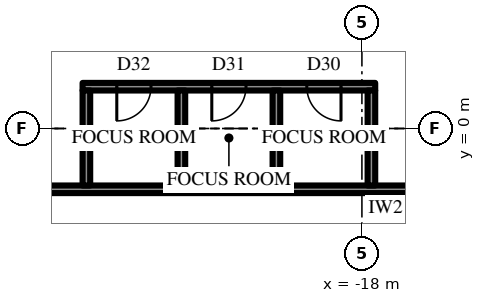
"""IFC4 building model, lengths in metres.
Left out: names, types, materials, properties, quantities, classifications, styles, units other than length and angle.
Written with IfcOpenShell. Run it as: python <this file> out.ifc"""

import sys

from ifc_helpers import new_model, si_unit, direction, frame, frame_2d, origin, place, context, subcontext, project, spatial, rectangle, extrude, element, fill, save


model = new_model("IFC4")
c1 = context("Model", 3, precision=1e-05, world=origin(), true_north=direction((0.0, 1.0)))
c2 = subcontext(c1, "Body", "Model", "MODEL_VIEW")
j1 = project(units=[si_unit("LENGTHUNIT", "METRE"), si_unit("PLANEANGLEUNIT", "RADIAN")], contexts=[c1])
p1 = place(None, origin())
s1 = spatial("IfcSite", under=j1, at=p1, CompositionType="ELEMENT")
p2 = place(p1, origin())
s2 = spatial("IfcBuilding", under=s1, at=p2, CompositionType="ELEMENT")
p3 = place(p2, frame((0.0, 0.0, 361.9)))
s3 = spatial("IfcBuildingStorey", under=s2, at=p3, CompositionType="ELEMENT", Elevation=361.9)
p4 = place(p3, frame((-29.459, -2.175, 0.0), z_axis=(0.0, 0.0, 1.0), x_axis=(0.499996453679, -0.866027451244, 0.0)))
e1 = element("IfcWall", 1, at=p4, inside=s3, PredefinedType="SOLIDWALL", context=c2, shape_type="SweptSolid", body=[
    extrude(rectangle(XDim=9.564, YDim=0.3, at=frame_2d((4.782, 0.0))), origin(), (0.0, 0.0, 1.0), 2.9),
])
p5 = place(p4, frame((0.866, 0.0, 0.6)))
e2 = element("IfcOpeningElement", 2, at=p5, cuts=e1, PredefinedType="OPENING", context=c2, shape_type="SweptSolid", body=[
    extrude(rectangle(XDim=2.55, YDim=2.05, at=frame_2d((1.275, 1.025))), frame((0.0, 0.16, 0.0), z_axis=(0.0, -1.0, 0.0), x_axis=(1.0, 0.0, 0.0)), (0.0, 0.0, 1.0), 0.32),
])
p6 = place(p4, frame((5.823, 0.0, 0.0)))
e3 = element("IfcOpeningElement", 3, at=p6, cuts=e1, PredefinedType="OPENING", context=c2, shape_type="SweptSolid", body=[
    extrude(rectangle(XDim=1.2, YDim=2.4, at=frame_2d((0.6, 1.2))), frame((0.0, 0.16, 0.0), z_axis=(0.0, -1.0, 0.0), x_axis=(1.0, 0.0, 0.0)), (0.0, 0.0, 1.0), 0.32),
])
p7 = place(p3, frame((-12.425, -1.6, 0.0), z_axis=(0.0, 0.0, 1.0), x_axis=(-1.0, 0.0, 0.0)))
e4 = element("IfcWall", 4, at=p7, inside=s3, PredefinedType="PARTITIONING", context=c2, shape_type="SweptSolid", body=[
    extrude(rectangle(XDim=16.5, YDim=0.2, at=frame_2d((8.25, 0.0))), origin(), (0.0, 0.0, 1.0), 4.0),
])
p8 = place(p7, frame((1.15, 0.0, 0.0)))
e5 = element("IfcOpeningElement", 5, at=p8, cuts=e4, PredefinedType="OPENING", context=c2, shape_type="SweptSolid", body=[
    extrude(rectangle(XDim=1.0, YDim=2.2, at=frame_2d((0.5, 1.1))), frame((0.0, 0.11, 0.0), z_axis=(0.0, -1.0, 0.0), x_axis=(1.0, 0.0, 0.0)), (0.0, 0.0, 1.0), 0.22),
])
p9 = place(p3, frame((-17.65, 1.1, 0.0), z_axis=(0.0, 0.0, 1.0), x_axis=(-1.0, 0.0, 0.0)))
e6 = element("IfcWall", 6, at=p9, inside=s3, PredefinedType="PARTITIONING", context=c2, shape_type="SweptSolid", body=[
    extrude(rectangle(XDim=7.7, YDim=0.2, at=frame_2d((3.85, 0.0))), origin(), (0.0, 0.0, 1.0), 4.0),
])
p10 = place(p9, frame((0.9, 0.0, 0.0)))
e7 = element("IfcOpeningElement", 7, at=p10, cuts=e6, PredefinedType="OPENING", context=c2, shape_type="SweptSolid", body=[
    extrude(rectangle(XDim=0.9, YDim=2.2, at=frame_2d((0.45, 1.1))), frame((0.0, 0.11, 0.0), z_axis=(0.0, -1.0, 0.0), x_axis=(1.0, 0.0, 0.0)), (0.0, 0.0, 1.0), 0.22),
])
p11 = place(p9, frame((3.4, 0.0, 0.0)))
e8 = element("IfcOpeningElement", 8, at=p11, cuts=e6, PredefinedType="OPENING", context=c2, shape_type="SweptSolid", body=[
    extrude(rectangle(XDim=0.9, YDim=2.2, at=frame_2d((0.45, 1.1))), frame((0.0, 0.11, 0.0), z_axis=(0.0, -1.0, 0.0), x_axis=(1.0, 0.0, 0.0)), (0.0, 0.0, 1.0), 0.22),
])
p12 = place(p9, frame((5.9, 0.0, 0.0)))
e9 = element("IfcOpeningElement", 9, at=p12, cuts=e6, PredefinedType="OPENING", context=c2, shape_type="SweptSolid", body=[
    extrude(rectangle(XDim=0.9, YDim=2.2, at=frame_2d((0.45, 1.1))), frame((0.0, 0.11, 0.0), z_axis=(0.0, -1.0, 0.0), x_axis=(1.0, 0.0, 0.0)), (0.0, 0.0, 1.0), 0.22),
])
for number, where, z_axis, x_axis in (
    (10, (-17.75, -1.5, 0.0), (0.0, 0.0, 1.0), (0.0, 1.0, 0.0)),
    (11, (-20.25, -1.5, 0.0), (0.0, 0.0, 1.0), (0.0, 1.0, 0.0)),
    (12, (-22.75, -1.5, 0.0), (0.0, 0.0, 1.0), (0.0, 1.0, 0.0)),
    (13, (-25.25, -1.5, 0.0), (0.0, 0.0, 1.0), (0.0, 1.0, 0.0)),
):
    element("IfcWall", number, at=place(p3, frame(where, z_axis=z_axis, x_axis=x_axis)), inside=s3, PredefinedType="PARTITIONING", context=c2, shape_type="SweptSolid", body=[
        extrude(rectangle(XDim=2.5, YDim=0.2, at=frame_2d((1.25, 0.0))), origin(), (0.0, 0.0, 1.0), 4.0),
    ])
p13 = place(p10, origin())
e14 = element("IfcDoor", 14, at=p13, inside=s3, OperationType="SINGLE_SWING_RIGHT", PredefinedType="DOOR", context=c2, shape_type="SweptSolid", body=[
    extrude(rectangle(XDim=0.9, YDim=2.2, at=frame_2d((0.45, 1.1))), frame((0.0, 0.025, 0.0), z_axis=(0.0, -1.0, 0.0), x_axis=(1.0, 0.0, 0.0)), (0.0, 0.0, 1.0), 0.05),
])
fill(e7, e14)
p14 = place(p11, origin())
e15 = element("IfcDoor", 15, at=p14, inside=s3, OperationType="SINGLE_SWING_LEFT", PredefinedType="DOOR", context=c2, shape_type="SweptSolid", body=[
    extrude(rectangle(XDim=0.9, YDim=2.2, at=frame_2d((0.45, 1.1))), frame((0.0, 0.025, 0.0), z_axis=(0.0, -1.0, 0.0), x_axis=(1.0, 0.0, 0.0)), (0.0, 0.0, 1.0), 0.05),
])
fill(e8, e15)
p15 = place(p12, origin())
e16 = element("IfcDoor", 16, at=p15, inside=s3, OperationType="SINGLE_SWING_LEFT", PredefinedType="DOOR", context=c2, shape_type="SweptSolid", body=[
    extrude(rectangle(XDim=0.9, YDim=2.2, at=frame_2d((0.45, 1.1))), frame((0.0, 0.025, 0.0), z_axis=(0.0, -1.0, 0.0), x_axis=(1.0, 0.0, 0.0)), (0.0, 0.0, 1.0), 0.05),
])
fill(e9, e16)
save(model, sys.argv[1])
